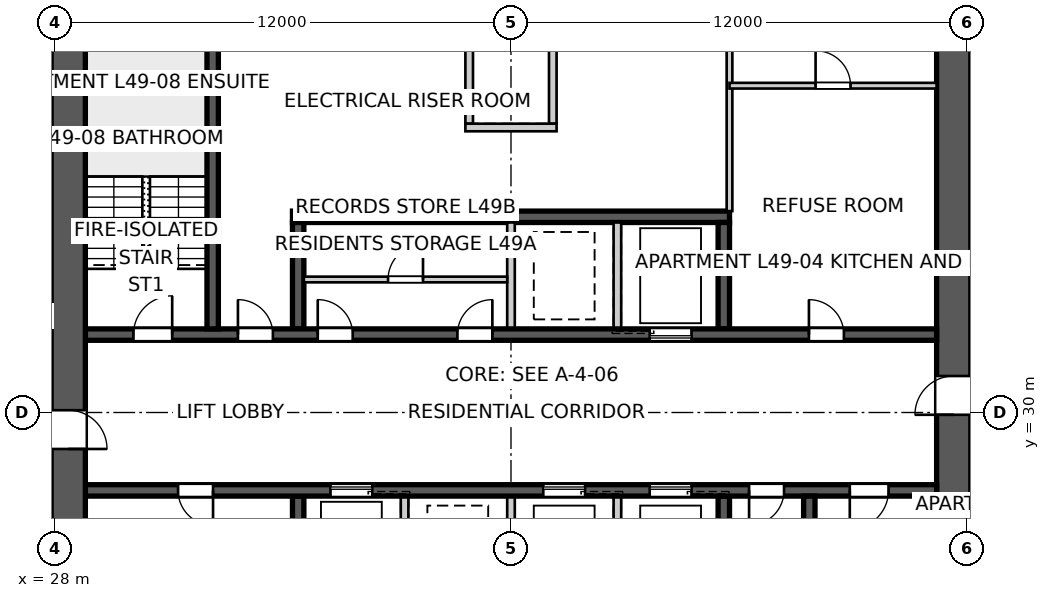
"""IFC4 building model, lengths in metres.
Left out: names, types, materials, properties, quantities, classifications, styles, units other than length and angle.
Written with IfcOpenShell. Run it as: python <this file> out.ifc"""

import sys

from ifc_helpers import new_model, si_unit, direction, frame, frame_2d, origin, place, context, subcontext, project, spatial, polyline, rectangle, outline, extrude, element, fill, save


model = new_model("IFC4")
c1 = context("Model", 3, precision=1e-05, world=origin(), true_north=direction((0.0, 1.0)))
c2 = subcontext(c1, "Body", "Model", "MODEL_VIEW")
j1 = project(units=[si_unit("LENGTHUNIT", "METRE"), si_unit("PLANEANGLEUNIT", "RADIAN")], contexts=[c1])
p1 = place(None, origin())
s1 = spatial("IfcSite", under=j1, at=p1, CompositionType="ELEMENT")
p2 = place(p1, origin())
s2 = spatial("IfcBuilding", under=s1, at=p2, CompositionType="ELEMENT")
p3 = place(p2, frame((0.0, 0.0, 179.4)))
s3 = spatial("IfcBuildingStorey", under=s2, at=p3, CompositionType="ELEMENT", Elevation=179.4)
p4 = place(p3, frame((51.65, 18.8, 0.0), z_axis=(0.0, 0.0, 1.0), x_axis=(0.0, 1.0, 0.0)))
e1 = element("IfcWall", 1, at=p4, inside=s3, PredefinedType="SHEAR", context=c2, shape_type="SweptSolid", body=[
    extrude(outline(polyline([(0.0, -0.45), (22.4, -0.45), (22.4, -0.025), (22.85, -0.025), (22.85, 0.025), (22.4, 0.025), (22.4, 0.45), (0.0, 0.45), (0.0, 0.025), (-0.45, 0.025), (-0.45, -0.025), (0.0, -0.025), (0.0, -0.45)])), origin(), (0.0, 0.0, 1.0), 3.4),
])
p5 = place(p4, frame((11.14, 0.0, 0.0)))
e2 = element("IfcOpeningElement", 2, at=p5, cuts=e1, PredefinedType="OPENING", context=c2, shape_type="SweptSolid", body=[
    extrude(rectangle(XDim=1.02, YDim=2.4, at=frame_2d((0.51, 1.2))), frame((0.0, 0.46, 0.0), z_axis=(0.0, -1.0, 0.0), x_axis=(1.0, 0.0, 0.0)), (0.0, 0.0, 1.0), 0.92),
])
p6 = place(p3, frame((28.35, 41.2, 0.0), z_axis=(0.0, 0.0, 1.0), x_axis=(0.0, -1.0, 0.0)))
e3 = element("IfcWall", 3, at=p6, inside=s3, PredefinedType="SHEAR", context=c2, shape_type="SweptSolid", body=[
    extrude(outline(polyline([(0.0, -0.45), (22.4, -0.45), (22.4, -0.025), (22.85, -0.025), (22.85, 0.025), (22.4, 0.025), (22.4, 0.45), (0.0, 0.45), (0.0, 0.025), (-0.45, 0.025), (-0.45, -0.025), (0.0, -0.025), (0.0, -0.45)])), origin(), (0.0, 0.0, 1.0), 3.4),
])
p7 = place(p6, frame((11.14, 0.0, 0.0)))
e4 = element("IfcOpeningElement", 4, at=p7, cuts=e3, PredefinedType="OPENING", context=c2, shape_type="SweptSolid", body=[
    extrude(rectangle(XDim=1.02, YDim=2.4, at=frame_2d((0.51, 1.2))), frame((0.0, 0.46, 0.0), z_axis=(0.0, -1.0, 0.0), x_axis=(1.0, 0.0, 0.0)), (0.0, 0.0, 1.0), 0.92),
])
p8 = place(p3, frame((28.8, 32.05, 0.0), z_axis=(0.0, 0.0, 1.0), x_axis=(1.0, 0.0, 0.0)))
e5 = element("IfcWall", 5, at=p8, inside=s3, PredefinedType="SHEAR", context=c2, shape_type="SweptSolid", body=[
    extrude(rectangle(XDim=22.4, YDim=0.3, at=frame_2d((11.2, 0.0))), origin(), (0.0, 0.0, 1.0), 3.4),
])
p9 = place(p8, frame((19.04, 0.0, 0.0)))
e6 = element("IfcOpeningElement", 6, at=p9, cuts=e5, PredefinedType="OPENING", context=c2, shape_type="SweptSolid", body=[
    extrude(rectangle(XDim=0.92, YDim=2.1, at=frame_2d((0.46, 1.05))), frame((0.0, 0.16, 0.0), z_axis=(0.0, -1.0, 0.0), x_axis=(1.0, 0.0, 0.0)), (0.0, 0.0, 1.0), 0.32),
])
p10 = place(p8, frame((1.265, 0.0, 0.0)))
e7 = element("IfcOpeningElement", 7, at=p10, cuts=e5, PredefinedType="OPENING", context=c2, shape_type="SweptSolid", body=[
    extrude(rectangle(XDim=1.02, YDim=2.1, at=frame_2d((0.51, 1.05))), frame((0.0, 0.16, 0.0), z_axis=(0.0, -1.0, 0.0), x_axis=(1.0, 0.0, 0.0)), (0.0, 0.0, 1.0), 0.32),
])
p11 = place(p8, frame((4.015, 0.0, 0.0)))
e8 = element("IfcOpeningElement", 8, at=p11, cuts=e5, PredefinedType="OPENING", context=c2, shape_type="SweptSolid", body=[
    extrude(rectangle(XDim=0.92, YDim=2.1, at=frame_2d((0.46, 1.05))), frame((0.0, 0.16, 0.0), z_axis=(0.0, -1.0, 0.0), x_axis=(1.0, 0.0, 0.0)), (0.0, 0.0, 1.0), 0.32),
])
p12 = place(p8, frame((6.115, 0.0, 0.0)))
e9 = element("IfcOpeningElement", 9, at=p12, cuts=e5, PredefinedType="OPENING", context=c2, shape_type="SweptSolid", body=[
    extrude(rectangle(XDim=0.92, YDim=2.1, at=frame_2d((0.46, 1.05))), frame((0.0, 0.16, 0.0), z_axis=(0.0, -1.0, 0.0), x_axis=(1.0, 0.0, 0.0)), (0.0, 0.0, 1.0), 0.32),
])
p13 = place(p8, frame((9.79, 0.0, 0.0)))
e10 = element("IfcOpeningElement", 10, at=p13, cuts=e5, PredefinedType="OPENING", context=c2, shape_type="SweptSolid", body=[
    extrude(rectangle(XDim=0.92, YDim=2.1, at=frame_2d((0.46, 1.05))), frame((0.0, 0.16, 0.0), z_axis=(0.0, -1.0, 0.0), x_axis=(1.0, 0.0, 0.0)), (0.0, 0.0, 1.0), 0.32),
])
p14 = place(p8, frame((14.85, 0.0, 0.0)))
e11 = element("IfcOpeningElement", 11, at=p14, cuts=e5, PredefinedType="OPENING", context=c2, shape_type="SweptSolid", body=[
    extrude(rectangle(XDim=1.1, YDim=2.1, at=frame_2d((0.55, 1.05))), frame((0.0, 0.16, 0.0), z_axis=(0.0, -1.0, 0.0), x_axis=(1.0, 0.0, 0.0)), (0.0, 0.0, 1.0), 0.32),
])
p15 = place(p3, frame((51.2, 27.95, 0.0), z_axis=(0.0, 0.0, 1.0), x_axis=(-1.0, 0.0, 0.0)))
e12 = element("IfcWall", 12, at=p15, inside=s3, PredefinedType="SHEAR", context=c2, shape_type="SweptSolid", body=[
    extrude(rectangle(XDim=22.4, YDim=0.3, at=frame_2d((11.2, 0.0))), origin(), (0.0, 0.0, 1.0), 3.4),
])
p16 = place(p15, frame((19.04, 0.0, 0.0)))
e13 = element("IfcOpeningElement", 13, at=p16, cuts=e12, PredefinedType="OPENING", context=c2, shape_type="SweptSolid", body=[
    extrude(rectangle(XDim=0.92, YDim=2.1, at=frame_2d((0.46, 1.05))), frame((0.0, 0.16, 0.0), z_axis=(0.0, -1.0, 0.0), x_axis=(1.0, 0.0, 0.0)), (0.0, 0.0, 1.0), 0.32),
])
p17 = place(p15, frame((1.265, 0.0, 0.0)))
e14 = element("IfcOpeningElement", 14, at=p17, cuts=e12, PredefinedType="OPENING", context=c2, shape_type="SweptSolid", body=[
    extrude(rectangle(XDim=1.02, YDim=2.1, at=frame_2d((0.51, 1.05))), frame((0.0, 0.16, 0.0), z_axis=(0.0, -1.0, 0.0), x_axis=(1.0, 0.0, 0.0)), (0.0, 0.0, 1.0), 0.32),
])
p18 = place(p15, frame((4.015, 0.0, 0.0)))
e15 = element("IfcOpeningElement", 15, at=p18, cuts=e12, PredefinedType="OPENING", context=c2, shape_type="SweptSolid", body=[
    extrude(rectangle(XDim=0.92, YDim=2.1, at=frame_2d((0.46, 1.05))), frame((0.0, 0.16, 0.0), z_axis=(0.0, -1.0, 0.0), x_axis=(1.0, 0.0, 0.0)), (0.0, 0.0, 1.0), 0.32),
])
p19 = place(p15, frame((6.45, 0.0, 0.0)))
e16 = element("IfcOpeningElement", 16, at=p19, cuts=e12, PredefinedType="OPENING", context=c2, shape_type="SweptSolid", body=[
    extrude(rectangle(XDim=1.1, YDim=2.1, at=frame_2d((0.55, 1.05))), frame((0.0, 0.16, 0.0), z_axis=(0.0, -1.0, 0.0), x_axis=(1.0, 0.0, 0.0)), (0.0, 0.0, 1.0), 0.32),
])
p20 = place(p15, frame((9.25, 0.0, 0.0)))
e17 = element("IfcOpeningElement", 17, at=p20, cuts=e12, PredefinedType="OPENING", context=c2, shape_type="SweptSolid", body=[
    extrude(rectangle(XDim=1.1, YDim=2.1, at=frame_2d((0.55, 1.05))), frame((0.0, 0.16, 0.0), z_axis=(0.0, -1.0, 0.0), x_axis=(1.0, 0.0, 0.0)), (0.0, 0.0, 1.0), 0.32),
])
p21 = place(p15, frame((14.85, 0.0, 0.0)))
e18 = element("IfcOpeningElement", 18, at=p21, cuts=e12, PredefinedType="OPENING", context=c2, shape_type="SweptSolid", body=[
    extrude(rectangle(XDim=1.1, YDim=2.1, at=frame_2d((0.55, 1.05))), frame((0.0, 0.16, 0.0), z_axis=(0.0, -1.0, 0.0), x_axis=(1.0, 0.0, 0.0)), (0.0, 0.0, 1.0), 0.32),
])
p22 = place(p3, frame((34.25, 35.15, 0.0), z_axis=(0.0, 0.0, 1.0), x_axis=(1.0, 0.0, 0.0)))
e19 = element("IfcWall", 19, at=p22, inside=s3, PredefinedType="SHEAR", context=c2, shape_type="SweptSolid", body=[
    extrude(rectangle(XDim=11.5, YDim=0.3, at=frame_2d((5.75, 0.0))), origin(), (0.0, 0.0, 1.0), 3.4),
])
for number, where, z_axis, x_axis in (
    (20, (34.4, 32.2, 0.0), (0.0, 0.0, 1.0), (0.0, 1.0, 0.0)),
    (21, (45.6, 27.8, 0.0), (0.0, 0.0, 1.0), (0.0, -1.0, 0.0)),
):
    element("IfcWall", number, at=place(p3, frame(where, z_axis=z_axis, x_axis=x_axis)), inside=s3, PredefinedType="SHEAR", context=c2, shape_type="SweptSolid", body=[
        extrude(rectangle(XDim=2.8, YDim=0.3, at=frame_2d((1.4, 0.0))), origin(), (0.0, 0.0, 1.0), 3.4),
    ])
for number, where, z_axis, x_axis in (
    (22, (42.8, 27.8, 0.0), (0.0, 0.0, 1.0), (0.0, -1.0, 0.0)),
    (23, (40.0, 32.2, 0.0), (0.0, 0.0, 1.0), (0.0, 1.0, 0.0)),
    (24, (40.0, 27.8, 0.0), (0.0, 0.0, 1.0), (0.0, -1.0, 0.0)),
    (25, (42.8, 32.2, 0.0), (0.0, 0.0, 1.0), (0.0, 1.0, 0.0)),
    (26, (37.2, 27.8, 0.0), (0.0, 0.0, 1.0), (0.0, -1.0, 0.0)),
):
    element("IfcWall", number, at=place(p3, frame(where, z_axis=z_axis, x_axis=x_axis)), inside=s3, PredefinedType="SOLIDWALL", context=c2, shape_type="SweptSolid", body=[
        extrude(rectangle(XDim=2.8, YDim=0.2, at=frame_2d((1.4, 0.0))), origin(), (0.0, 0.0, 1.0), 3.4),
    ])
for number, where, z_axis, x_axis in (
    (27, (45.6, 32.2, 0.0), (0.0, 0.0, 1.0), (0.0, 1.0, 0.0)),
    (28, (34.4, 27.8, 0.0), (0.0, 0.0, 1.0), (0.0, -1.0, 0.0)),
):
    element("IfcWall", number, at=place(p3, frame(where, z_axis=z_axis, x_axis=x_axis)), inside=s3, PredefinedType="SHEAR", context=c2, shape_type="SweptSolid", body=[
        extrude(rectangle(XDim=2.8, YDim=0.3, at=frame_2d((1.4, 0.0))), origin(), (0.0, 0.0, 1.0), 3.4),
    ])
for number, where, z_axis, x_axis in (
    (29, (32.15, 32.2, 0.0), (0.0, 0.0, 1.0), (0.0, 1.0, 0.0)),
    (30, (47.85, 27.8, 0.0), (0.0, 0.0, 1.0), (0.0, -1.0, 0.0)),
):
    element("IfcWall", number, at=place(p3, frame(where, z_axis=z_axis, x_axis=x_axis)), inside=s3, PredefinedType="SHEAR", context=c2, shape_type="SweptSolid", body=[
        extrude(rectangle(XDim=7.7, YDim=0.3, at=frame_2d((3.85, 0.0))), origin(), (0.0, 0.0, 1.0), 3.4),
    ])
for number, where, z_axis, x_axis in (
    (31, (38.9, 37.6, 0.0), (0.0, 0.0, 1.0), (0.0, 1.0, 0.0)),
    (32, (41.1, 37.6, 0.0), (0.0, 0.0, 1.0), (0.0, 1.0, 0.0)),
):
    element("IfcWall", number, at=place(p3, frame(where, z_axis=z_axis, x_axis=x_axis)), inside=s3, PredefinedType="SOLIDWALL", context=c2, shape_type="SweptSolid", body=[
        extrude(rectangle(XDim=2.0, YDim=0.2, at=frame_2d((1.0, 0.0))), origin(), (0.0, 0.0, 1.0), 3.4),
    ])
p23 = place(p3, frame((38.8, 37.5, 0.0), z_axis=(0.0, 0.0, 1.0), x_axis=(1.0, 0.0, 0.0)))
e33 = element("IfcWall", 33, at=p23, inside=s3, PredefinedType="SOLIDWALL", context=c2, shape_type="SweptSolid", body=[
    extrude(rectangle(XDim=2.4, YDim=0.2, at=frame_2d((1.2, 0.0))), origin(), (0.0, 0.0, 1.0), 3.4),
])
p24 = place(p3, frame((45.75, 41.2, 0.0), z_axis=(0.0, 0.0, 1.0), x_axis=(0.0, -1.0, 0.0)))
e34 = element("IfcWall", 34, at=p24, inside=s3, PredefinedType="SOLIDWALL", context=c2, shape_type="SweptSolid", body=[
    extrude(rectangle(XDim=5.9, YDim=0.15, at=frame_2d((2.95, 0.0))), origin(), (0.0, 0.0, 1.0), 3.25),
])
p25 = place(p3, frame((45.75, 38.6, 0.0), z_axis=(0.0, 0.0, 1.0), x_axis=(1.0, 0.0, 0.0)))
e35 = element("IfcWall", 35, at=p25, inside=s3, PredefinedType="SOLIDWALL", context=c2, shape_type="SweptSolid", body=[
    extrude(rectangle(XDim=5.45, YDim=0.15, at=frame_2d((2.725, 0.0))), origin(), (0.0, 0.0, 1.0), 3.25),
])
p26 = place(p25, frame((2.265, 0.0, 0.0)))
e36 = element("IfcOpeningElement", 36, at=p26, cuts=e35, PredefinedType="OPENING", context=c2, shape_type="SweptSolid", body=[
    extrude(rectangle(XDim=0.92, YDim=2.1, at=frame_2d((0.46, 1.05))), frame((0.0, 0.085, 0.0), z_axis=(0.0, -1.0, 0.0), x_axis=(1.0, 0.0, 0.0)), (0.0, 0.0, 1.0), 0.17),
])
p27 = place(p3, frame((34.55, 33.5, 0.0), z_axis=(0.0, 0.0, 1.0), x_axis=(1.0, 0.0, 0.0)))
e37 = element("IfcWall", 37, at=p27, inside=s3, PredefinedType="SOLIDWALL", context=c2, shape_type="SweptSolid", body=[
    extrude(rectangle(XDim=5.35, YDim=0.15, at=frame_2d((2.675, 0.0))), origin(), (0.0, 0.0, 1.0), 3.25),
])
p28 = place(p27, frame((2.215, 0.0, 0.0)))
e38 = element("IfcOpeningElement", 38, at=p28, cuts=e37, PredefinedType="OPENING", context=c2, shape_type="SweptSolid", body=[
    extrude(rectangle(XDim=0.92, YDim=2.1, at=frame_2d((0.46, 1.05))), frame((0.0, 0.085, 0.0), z_axis=(0.0, -1.0, 0.0), x_axis=(1.0, 0.0, 0.0)), (0.0, 0.0, 1.0), 0.17),
])
p29 = place(p9, origin())
e39 = element("IfcDoor", 39, at=p29, inside=s3, OperationType="SINGLE_SWING_LEFT", PredefinedType="DOOR", context=c2, shape_type="SweptSolid", body=[
    extrude(rectangle(XDim=0.92, YDim=2.1, at=frame_2d((0.46, 1.05))), frame((0.0, 0.025, 0.0), z_axis=(0.0, -1.0, 0.0), x_axis=(1.0, 0.0, 0.0)), (0.0, 0.0, 1.0), 0.05),
])
fill(e6, e39)
p30 = place(p16, origin())
e40 = element("IfcDoor", 40, at=p30, inside=s3, OperationType="SINGLE_SWING_LEFT", PredefinedType="DOOR", context=c2, shape_type="SweptSolid", body=[
    extrude(rectangle(XDim=0.92, YDim=2.1, at=frame_2d((0.46, 1.05))), frame((0.0, 0.025, 0.0), z_axis=(0.0, -1.0, 0.0), x_axis=(1.0, 0.0, 0.0)), (0.0, 0.0, 1.0), 0.05),
])
fill(e13, e40)
p31 = place(p17, origin())
e41 = element("IfcDoor", 41, at=p31, inside=s3, OperationType="SINGLE_SWING_RIGHT", PredefinedType="DOOR", context=c2, shape_type="SweptSolid", body=[
    extrude(rectangle(XDim=1.02, YDim=2.1, at=frame_2d((0.51, 1.05))), frame((0.0, 0.025, 0.0), z_axis=(0.0, -1.0, 0.0), x_axis=(1.0, 0.0, 0.0)), (0.0, 0.0, 1.0), 0.05),
])
fill(e14, e41)
p32 = place(p10, origin())
e42 = element("IfcDoor", 42, at=p32, inside=s3, OperationType="SINGLE_SWING_RIGHT", PredefinedType="DOOR", context=c2, shape_type="SweptSolid", body=[
    extrude(rectangle(XDim=1.02, YDim=2.1, at=frame_2d((0.51, 1.05))), frame((0.0, 0.025, 0.0), z_axis=(0.0, -1.0, 0.0), x_axis=(1.0, 0.0, 0.0)), (0.0, 0.0, 1.0), 0.05),
])
fill(e7, e42)
p33 = place(p11, origin())
e43 = element("IfcDoor", 43, at=p33, inside=s3, OperationType="SINGLE_SWING_LEFT", PredefinedType="DOOR", context=c2, shape_type="SweptSolid", body=[
    extrude(rectangle(XDim=0.92, YDim=2.1, at=frame_2d((0.46, 1.05))), frame((0.0, 0.025, 0.0), z_axis=(0.0, -1.0, 0.0), x_axis=(1.0, 0.0, 0.0)), (0.0, 0.0, 1.0), 0.05),
])
fill(e8, e43)
p34 = place(p18, origin())
e44 = element("IfcDoor", 44, at=p34, inside=s3, OperationType="SINGLE_SWING_RIGHT", PredefinedType="DOOR", context=c2, shape_type="SweptSolid", body=[
    extrude(rectangle(XDim=0.92, YDim=2.1, at=frame_2d((0.46, 1.05))), frame((0.0, 0.025, 0.0), z_axis=(0.0, -1.0, 0.0), x_axis=(1.0, 0.0, 0.0)), (0.0, 0.0, 1.0), 0.05),
])
fill(e15, e44)
p35 = place(p26, origin())
e45 = element("IfcDoor", 45, at=p35, inside=s3, OperationType="SINGLE_SWING_LEFT", PredefinedType="DOOR", context=c2, shape_type="SweptSolid", body=[
    extrude(rectangle(XDim=0.92, YDim=2.1, at=frame_2d((0.46, 1.05))), frame((0.0, 0.025, 0.0), z_axis=(0.0, -1.0, 0.0), x_axis=(1.0, 0.0, 0.0)), (0.0, 0.0, 1.0), 0.05),
])
fill(e36, e45)
p36 = place(p12, origin())
e46 = element("IfcDoor", 46, at=p36, inside=s3, OperationType="SINGLE_SWING_LEFT", PredefinedType="DOOR", context=c2, shape_type="SweptSolid", body=[
    extrude(rectangle(XDim=0.92, YDim=2.1, at=frame_2d((0.46, 1.05))), frame((0.0, 0.025, 0.0), z_axis=(0.0, -1.0, 0.0), x_axis=(1.0, 0.0, 0.0)), (0.0, 0.0, 1.0), 0.05),
])
fill(e9, e46)
p37 = place(p13, origin())
e47 = element("IfcDoor", 47, at=p37, inside=s3, OperationType="SINGLE_SWING_RIGHT", PredefinedType="DOOR", context=c2, shape_type="SweptSolid", body=[
    extrude(rectangle(XDim=0.92, YDim=2.1, at=frame_2d((0.46, 1.05))), frame((0.0, 0.025, 0.0), z_axis=(0.0, -1.0, 0.0), x_axis=(1.0, 0.0, 0.0)), (0.0, 0.0, 1.0), 0.05),
])
fill(e10, e47)
p38 = place(p28, origin())
e48 = element("IfcDoor", 48, at=p38, inside=s3, OperationType="SINGLE_SWING_RIGHT", PredefinedType="DOOR", context=c2, shape_type="SweptSolid", body=[
    extrude(rectangle(XDim=0.92, YDim=2.1, at=frame_2d((0.46, 1.05))), frame((0.0, 0.025, 0.0), z_axis=(0.0, -1.0, 0.0), x_axis=(1.0, 0.0, 0.0)), (0.0, 0.0, 1.0), 0.05),
])
fill(e38, e48)
p39 = place(p5, origin())
e49 = element("IfcDoor", 49, at=p39, inside=s3, OperationType="SINGLE_SWING_LEFT", PredefinedType="DOOR", context=c2, shape_type="SweptSolid", body=[
    extrude(rectangle(XDim=1.02, YDim=2.4, at=frame_2d((0.51, 1.2))), frame((0.0, 0.025, 0.0), z_axis=(0.0, -1.0, 0.0), x_axis=(1.0, 0.0, 0.0)), (0.0, 0.0, 1.0), 0.05),
])
fill(e2, e49)
p40 = place(p7, origin())
e50 = element("IfcDoor", 50, at=p40, inside=s3, OperationType="SINGLE_SWING_RIGHT", PredefinedType="DOOR", context=c2, shape_type="SweptSolid", body=[
    extrude(rectangle(XDim=1.02, YDim=2.4, at=frame_2d((0.51, 1.2))), frame((0.0, 0.025, 0.0), z_axis=(0.0, -1.0, 0.0), x_axis=(1.0, 0.0, 0.0)), (0.0, 0.0, 1.0), 0.05),
])
fill(e4, e50)
p41 = place(p19, origin())
e51 = element("IfcDoor", 51, at=p41, inside=s3, OperationType="SLIDING_TO_LEFT", PredefinedType="DOOR", context=c2, shape_type="SweptSolid", body=[
    extrude(rectangle(XDim=1.1, YDim=2.1, at=frame_2d((0.55, 1.05))), frame((0.0, 0.025, 0.0), z_axis=(0.0, -1.0, 0.0), x_axis=(1.0, 0.0, 0.0)), (0.0, 0.0, 1.0), 0.05),
])
fill(e16, e51)
p42 = place(p20, origin())
e52 = element("IfcDoor", 52, at=p42, inside=s3, OperationType="SLIDING_TO_LEFT", PredefinedType="DOOR", context=c2, shape_type="SweptSolid", body=[
    extrude(rectangle(XDim=1.1, YDim=2.1, at=frame_2d((0.55, 1.05))), frame((0.0, 0.025, 0.0), z_axis=(0.0, -1.0, 0.0), x_axis=(1.0, 0.0, 0.0)), (0.0, 0.0, 1.0), 0.05),
])
fill(e17, e52)
p43 = place(p14, origin())
e53 = element("IfcDoor", 53, at=p43, inside=s3, OperationType="SLIDING_TO_LEFT", PredefinedType="DOOR", context=c2, shape_type="SweptSolid", body=[
    extrude(rectangle(XDim=1.1, YDim=2.1, at=frame_2d((0.55, 1.05))), frame((0.0, 0.025, 0.0), z_axis=(0.0, -1.0, 0.0), x_axis=(1.0, 0.0, 0.0)), (0.0, 0.0, 1.0), 0.05),
])
fill(e11, e53)
p44 = place(p21, origin())
e54 = element("IfcDoor", 54, at=p44, inside=s3, OperationType="SLIDING_TO_LEFT", PredefinedType="DOOR", context=c2, shape_type="SweptSolid", body=[
    extrude(rectangle(XDim=1.1, YDim=2.1, at=frame_2d((0.55, 1.05))), frame((0.0, 0.025, 0.0), z_axis=(0.0, -1.0, 0.0), x_axis=(1.0, 0.0, 0.0)), (0.0, 0.0, 1.0), 0.05),
])
fill(e18, e54)
save(model, sys.argv[1])
